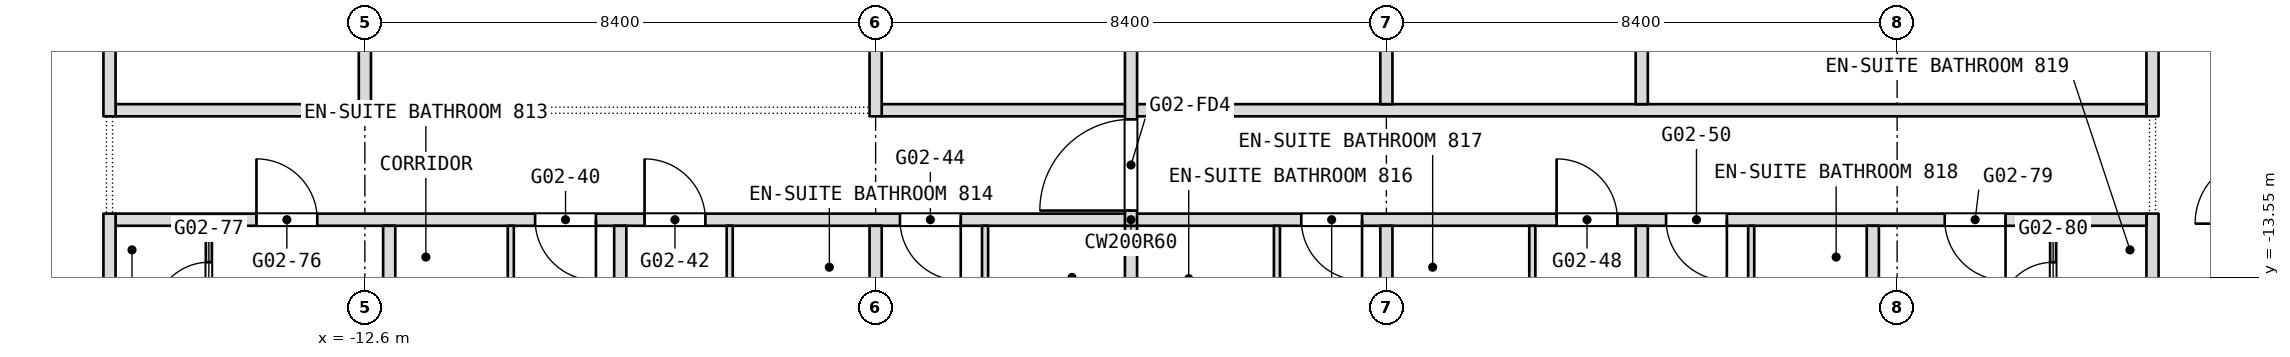
"""IFC4 building model, lengths in metres.
Left out: names, types, materials, properties, quantities, classifications, styles, units other than length and angle.
Written with IfcOpenShell. Run it as: python <this file> out.ifc"""

import sys

from ifc_helpers import new_model, si_unit, direction, frame, frame_2d, origin, place, context, subcontext, project, spatial, rectangle, extrude, element, fill, save


model = new_model("IFC4")
c1 = context("Model", 3, precision=1e-05, world=origin(), true_north=direction((0.0, 1.0)))
c2 = subcontext(c1, "Body", "Model", "MODEL_VIEW")
j1 = project(units=[si_unit("LENGTHUNIT", "METRE"), si_unit("PLANEANGLEUNIT", "RADIAN")], contexts=[c1])
p1 = place(None, origin())
s1 = spatial("IfcSite", under=j1, at=p1, CompositionType="ELEMENT")
p2 = place(p1, origin())
s2 = spatial("IfcBuilding", under=s1, at=p2, CompositionType="ELEMENT")
p3 = place(p2, frame((0.0, 0.0, 43.7)))
s3 = spatial("IfcBuildingStorey", under=s2, at=p3, CompositionType="ELEMENT", Elevation=43.7)
p4 = place(p3, frame((16.8, -17.143, 0.0), z_axis=(0.0, 0.0, 1.0), x_axis=(0.0, 1.0, 0.0)))
e1 = element("IfcWall", 1, at=p4, inside=s3, PredefinedType="PARTITIONING", context=c2, shape_type="SweptSolid", body=[
    extrude(rectangle(XDim=4.643, YDim=0.2, at=frame_2d((2.322, 0.0))), origin(), (0.0, 0.0, 1.0), 3.34),
])
p5 = place(p4, frame((0.772, 0.0, 0.0)))
e2 = element("IfcOpeningElement", 2, at=p5, cuts=e1, PredefinedType="OPENING", context=c2, shape_type="SweptSolid", body=[
    extrude(rectangle(XDim=0.9, YDim=2.1, at=frame_2d((0.45, 1.05))), frame((0.0, 0.1, 0.0), z_axis=(0.0, -1.0, 0.0), x_axis=(1.0, 0.0, 0.0)), (0.0, 0.0, 1.0), 0.2),
])
p6 = place(p3, frame((16.8, -10.9, 0.0), z_axis=(0.0, 0.0, 1.0), x_axis=(0.0, 1.0, 0.0)))
e3 = element("IfcWall", 3, at=p6, inside=s3, PredefinedType="PARTITIONING", context=c2, shape_type="SweptSolid", body=[
    extrude(rectangle(XDim=7.3, YDim=0.2, at=frame_2d((3.65, 0.0))), origin(), (0.0, 0.0, 1.0), 3.34),
])
p7 = place(p6, frame((3.15, 0.0, 0.0)))
e4 = element("IfcOpeningElement", 4, at=p7, cuts=e3, PredefinedType="OPENING", context=c2, shape_type="SweptSolid", body=[
    extrude(rectangle(XDim=1.0, YDim=2.1, at=frame_2d((0.5, 1.05))), frame((0.0, 0.1, 0.0), z_axis=(0.0, -1.0, 0.0), x_axis=(1.0, 0.0, 0.0)), (0.0, 0.0, 1.0), 0.2),
])
p8 = place(p3, frame((15.166, -15.0, 0.0), z_axis=(0.0, 0.0, 1.0), x_axis=(0.0, 1.0, 0.0)))
e5 = element("IfcWall", 5, at=p8, inside=s3, PredefinedType="PARTITIONING", context=c2, shape_type="SweptSolid", body=[
    extrude(rectangle(XDim=2.3, YDim=0.1, at=frame_2d((1.15, 0.0))), origin(), (0.0, 0.0, 1.0), 3.34),
])
p9 = place(p8, frame((0.8, 0.0, 0.0)))
e6 = element("IfcOpeningElement", 6, at=p9, cuts=e5, PredefinedType="OPENING", context=c2, shape_type="SweptSolid", body=[
    extrude(rectangle(XDim=0.9, YDim=2.1, at=frame_2d((0.45, 1.05))), frame((0.0, 0.05, 0.0), z_axis=(0.0, -1.0, 0.0), x_axis=(1.0, 0.0, 0.0)), (0.0, 0.0, 1.0), 0.1),
])
p10 = place(p3, frame((-16.7, -12.6, 0.0), z_axis=(0.0, 0.0, 1.0), x_axis=(1.0, 0.0, 0.0)))
e7 = element("IfcWall", 7, at=p10, inside=s3, PredefinedType="PARTITIONING", context=c2, shape_type="SweptSolid", body=[
    extrude(rectangle(XDim=33.4, YDim=0.2, at=frame_2d((16.7, 0.0))), origin(), (0.0, 0.0, 1.0), 3.34),
])
p11 = place(p10, frame((6.9, 0.0, 0.0)))
e8 = element("IfcOpeningElement", 8, at=p11, cuts=e7, PredefinedType="OPENING", context=c2, shape_type="SweptSolid", body=[
    extrude(rectangle(XDim=1.0, YDim=2.1, at=frame_2d((0.5, 1.05))), frame((0.0, 0.1, 0.0), z_axis=(0.0, -1.0, 0.0), x_axis=(1.0, 0.0, 0.0)), (0.0, 0.0, 1.0), 0.2),
])
p12 = place(p10, frame((8.7, 0.0, 0.0)))
e9 = element("IfcOpeningElement", 9, at=p12, cuts=e7, PredefinedType="OPENING", context=c2, shape_type="SweptSolid", body=[
    extrude(rectangle(XDim=1.0, YDim=2.1, at=frame_2d((0.5, 1.05))), frame((0.0, 0.1, 0.0), z_axis=(0.0, -1.0, 0.0), x_axis=(1.0, 0.0, 0.0)), (0.0, 0.0, 1.0), 0.2),
])
p13 = place(p10, frame((12.9, 0.0, 0.0)))
e10 = element("IfcOpeningElement", 10, at=p13, cuts=e7, PredefinedType="OPENING", context=c2, shape_type="SweptSolid", body=[
    extrude(rectangle(XDim=1.0, YDim=2.1, at=frame_2d((0.5, 1.05))), frame((0.0, 0.1, 0.0), z_axis=(0.0, -1.0, 0.0), x_axis=(1.0, 0.0, 0.0)), (0.0, 0.0, 1.0), 0.2),
])
p14 = place(p10, frame((19.5, 0.0, 0.0)))
e11 = element("IfcOpeningElement", 11, at=p14, cuts=e7, PredefinedType="OPENING", context=c2, shape_type="SweptSolid", body=[
    extrude(rectangle(XDim=1.0, YDim=2.1, at=frame_2d((0.5, 1.05))), frame((0.0, 0.1, 0.0), z_axis=(0.0, -1.0, 0.0), x_axis=(1.0, 0.0, 0.0)), (0.0, 0.0, 1.0), 0.2),
])
p15 = place(p10, frame((23.7, 0.0, 0.0)))
e12 = element("IfcOpeningElement", 12, at=p15, cuts=e7, PredefinedType="OPENING", context=c2, shape_type="SweptSolid", body=[
    extrude(rectangle(XDim=1.0, YDim=2.1, at=frame_2d((0.5, 1.05))), frame((0.0, 0.1, 0.0), z_axis=(0.0, -1.0, 0.0), x_axis=(1.0, 0.0, 0.0)), (0.0, 0.0, 1.0), 0.2),
])
p16 = place(p10, frame((25.5, 0.0, 0.0)))
e13 = element("IfcOpeningElement", 13, at=p16, cuts=e7, PredefinedType="OPENING", context=c2, shape_type="SweptSolid", body=[
    extrude(rectangle(XDim=1.0, YDim=2.1, at=frame_2d((0.5, 1.05))), frame((0.0, 0.1, 0.0), z_axis=(0.0, -1.0, 0.0), x_axis=(1.0, 0.0, 0.0)), (0.0, 0.0, 1.0), 0.2),
])
p17 = place(p10, frame((2.317, 0.0, 0.0)))
e14 = element("IfcOpeningElement", 14, at=p17, cuts=e7, PredefinedType="OPENING", context=c2, shape_type="SweptSolid", body=[
    extrude(rectangle(XDim=1.0, YDim=2.1, at=frame_2d((0.5, 1.05))), frame((0.0, 0.1, 0.0), z_axis=(0.0, -1.0, 0.0), x_axis=(1.0, 0.0, 0.0)), (0.0, 0.0, 1.0), 0.2),
])
p18 = place(p10, frame((30.083, 0.0, 0.0)))
e15 = element("IfcOpeningElement", 15, at=p18, cuts=e7, PredefinedType="OPENING", context=c2, shape_type="SweptSolid", body=[
    extrude(rectangle(XDim=1.0, YDim=2.1, at=frame_2d((0.5, 1.05))), frame((0.0, 0.1, 0.0), z_axis=(0.0, -1.0, 0.0), x_axis=(1.0, 0.0, 0.0)), (0.0, 0.0, 1.0), 0.2),
])
p19 = place(p3, frame((12.2, -15.325, 0.0), z_axis=(0.0, 0.0, 1.0), x_axis=(0.0, 1.0, 0.0)))
e16 = element("IfcWall", 16, at=p19, inside=s3, PredefinedType="PARTITIONING", context=c2, shape_type="SweptSolid", body=[
    extrude(rectangle(XDim=2.625, YDim=0.2, at=frame_2d((1.312, 0.0))), origin(), (0.0, 0.0, 1.0), 3.34),
])
p20 = place(p3, frame((-16.7, -10.8, 0.0), z_axis=(0.0, 0.0, 1.0), x_axis=(1.0, 0.0, 0.0)))
e17 = element("IfcWall", 17, at=p20, inside=s3, PredefinedType="PARTITIONING", context=c2, shape_type="SweptSolid", body=[
    extrude(rectangle(XDim=4.0, YDim=0.2, at=frame_2d((2.0, 0.0))), origin(), (0.0, 0.0, 1.0), 3.34),
])
p21 = place(p3, frame((-4.1, -10.8, 0.0), z_axis=(0.0, 0.0, 1.0), x_axis=(1.0, 0.0, 0.0)))
e18 = element("IfcWall", 18, at=p21, inside=s3, PredefinedType="PARTITIONING", context=c2, shape_type="SweptSolid", body=[
    extrude(rectangle(XDim=20.8, YDim=0.2, at=frame_2d((10.4, 0.0))), origin(), (0.0, 0.0, 1.0), 3.34),
])
p22 = place(p3, frame((10.2, -15.425, 0.0), z_axis=(0.0, 0.0, 1.0), x_axis=(0.0, 1.0, 0.0)))
e19 = element("IfcWall", 19, at=p22, inside=s3, PredefinedType="PARTITIONING", context=c2, shape_type="SweptSolid", body=[
    extrude(rectangle(XDim=2.725, YDim=0.1, at=frame_2d((1.363, 0.0))), origin(), (0.0, 0.0, 1.0), 3.34),
])
p23 = place(p22, frame((0.849, 0.0, 0.0)))
e20 = element("IfcOpeningElement", 20, at=p23, cuts=e19, PredefinedType="OPENING", context=c2, shape_type="SweptSolid", body=[
    extrude(rectangle(XDim=0.9, YDim=2.1, at=frame_2d((0.45, 1.05))), frame((0.0, 0.05, 0.0), z_axis=(0.0, -1.0, 0.0), x_axis=(1.0, 0.0, 0.0)), (0.0, 0.0, 1.0), 0.1),
])
p24 = place(p3, frame((8.4, -17.7, 0.0), z_axis=(0.0, 0.0, 1.0), x_axis=(0.0, 1.0, 0.0)))
e21 = element("IfcWall", 21, at=p24, inside=s3, PredefinedType="PARTITIONING", context=c2, shape_type="SweptSolid", body=[
    extrude(rectangle(XDim=5.0, YDim=0.2, at=frame_2d((2.5, 0.0))), origin(), (0.0, 0.0, 1.0), 3.34),
])
p25 = place(p3, frame((8.4, -10.7, 0.0), z_axis=(0.0, 0.0, 1.0), x_axis=(0.0, 1.0, 0.0)))
e22 = element("IfcWall", 22, at=p25, inside=s3, PredefinedType="PARTITIONING", context=c2, shape_type="SweptSolid", body=[
    extrude(rectangle(XDim=3.6, YDim=0.2, at=frame_2d((1.8, 0.0))), origin(), (0.0, 0.0, 1.0), 3.34),
])
p26 = place(p3, frame((6.6, -15.325, 0.0), z_axis=(0.0, 0.0, 1.0), x_axis=(0.0, 1.0, 0.0)))
e23 = element("IfcWall", 23, at=p26, inside=s3, PredefinedType="PARTITIONING", context=c2, shape_type="SweptSolid", body=[
    extrude(rectangle(XDim=2.625, YDim=0.1, at=frame_2d((1.312, 0.0))), origin(), (0.0, 0.0, 1.0), 3.34),
])
p27 = place(p26, frame((0.749, 0.0, 0.0)))
e24 = element("IfcOpeningElement", 24, at=p27, cuts=e23, PredefinedType="OPENING", context=c2, shape_type="SweptSolid", body=[
    extrude(rectangle(XDim=0.9, YDim=2.1, at=frame_2d((0.45, 1.05))), frame((0.0, 0.05, 0.0), z_axis=(0.0, -1.0, 0.0), x_axis=(1.0, 0.0, 0.0)), (0.0, 0.0, 1.0), 0.1),
])
p28 = place(p3, frame((4.2, -17.7, 0.0), z_axis=(0.0, 0.0, 1.0), x_axis=(0.0, 1.0, 0.0)))
e25 = element("IfcWall", 25, at=p28, inside=s3, PredefinedType="PARTITIONING", context=c2, shape_type="SweptSolid", body=[
    extrude(rectangle(XDim=5.0, YDim=0.2, at=frame_2d((2.5, 0.0))), origin(), (0.0, 0.0, 1.0), 3.34),
])
p29 = place(p3, frame((4.2, -10.7, 0.0), z_axis=(0.0, 0.0, 1.0), x_axis=(0.0, 1.0, 0.0)))
e26 = element("IfcWall", 26, at=p29, inside=s3, PredefinedType="PARTITIONING", context=c2, shape_type="SweptSolid", body=[
    extrude(rectangle(XDim=8.8, YDim=0.2, at=frame_2d((4.4, 0.0))), origin(), (0.0, 0.0, 1.0), 3.34),
])
p30 = place(p3, frame((2.4, -15.325, 0.0), z_axis=(0.0, 0.0, 1.0), x_axis=(0.0, 1.0, 0.0)))
e27 = element("IfcWall", 27, at=p30, inside=s3, PredefinedType="PARTITIONING", context=c2, shape_type="SweptSolid", body=[
    extrude(rectangle(XDim=2.625, YDim=0.1, at=frame_2d((1.312, 0.0))), origin(), (0.0, 0.0, 1.0), 3.34),
])
p31 = place(p3, frame((0.0, -17.7, 0.0), z_axis=(0.0, 0.0, 1.0), x_axis=(0.0, 1.0, 0.0)))
e28 = element("IfcWall", 28, at=p31, inside=s3, PredefinedType="PARTITIONING", context=c2, shape_type="SweptSolid", body=[
    extrude(rectangle(XDim=5.0, YDim=0.2, at=frame_2d((2.5, 0.0))), origin(), (0.0, 0.0, 1.0), 3.34),
])
p32 = place(p3, frame((0.0, -12.7, 0.0), z_axis=(0.0, 0.0, 1.0), x_axis=(0.0, 1.0, 0.0)))
e29 = element("IfcWall", 29, at=p32, inside=s3, PredefinedType="PARTITIONING", context=c2, shape_type="SweptSolid", body=[
    extrude(rectangle(XDim=12.7, YDim=0.2, at=frame_2d((6.35, 0.0))), origin(), (0.0, 0.0, 1.0), 3.34),
])
p33 = place(p32, frame((11.05, 0.0, 0.0)))
e30 = element("IfcOpeningElement", 30, at=p33, cuts=e29, PredefinedType="OPENING", context=c2, shape_type="SweptSolid", body=[
    extrude(rectangle(XDim=1.5, YDim=2.1, at=frame_2d((0.75, 1.05))), frame((0.0, 0.1, 0.0), z_axis=(0.0, -1.0, 0.0), x_axis=(1.0, 0.0, 0.0)), (0.0, 0.0, 1.0), 0.2),
])
p34 = place(p32, frame((0.25, 0.0, 0.0)))
e31 = element("IfcOpeningElement", 31, at=p34, cuts=e29, PredefinedType="OPENING", context=c2, shape_type="SweptSolid", body=[
    extrude(rectangle(XDim=1.5, YDim=2.1, at=frame_2d((0.75, 1.05))), frame((0.0, 0.1, 0.0), z_axis=(0.0, -1.0, 0.0), x_axis=(1.0, 0.0, 0.0)), (0.0, 0.0, 1.0), 0.2),
])
p35 = place(p3, frame((-2.4, -15.425, 0.0), z_axis=(0.0, 0.0, 1.0), x_axis=(0.0, 1.0, 0.0)))
e32 = element("IfcWall", 32, at=p35, inside=s3, PredefinedType="PARTITIONING", context=c2, shape_type="SweptSolid", body=[
    extrude(rectangle(XDim=2.725, YDim=0.1, at=frame_2d((1.363, 0.0))), origin(), (0.0, 0.0, 1.0), 3.34),
])
p36 = place(p3, frame((-4.2, -17.7, 0.0), z_axis=(0.0, 0.0, 1.0), x_axis=(0.0, 1.0, 0.0)))
e33 = element("IfcWall", 33, at=p36, inside=s3, PredefinedType="PARTITIONING", context=c2, shape_type="SweptSolid", body=[
    extrude(rectangle(XDim=5.0, YDim=0.2, at=frame_2d((2.5, 0.0))), origin(), (0.0, 0.0, 1.0), 3.34),
])
p37 = place(p3, frame((-4.2, -10.9, 0.0), z_axis=(0.0, 0.0, 1.0), x_axis=(0.0, 1.0, 0.0)))
e34 = element("IfcWall", 34, at=p37, inside=s3, PredefinedType="PARTITIONING", context=c2, shape_type="SweptSolid", body=[
    extrude(rectangle(XDim=9.0, YDim=0.2, at=frame_2d((4.5, 0.0))), origin(), (0.0, 0.0, 1.0), 3.34),
])
p38 = place(p3, frame((-6.6, -15.425, 0.0), z_axis=(0.0, 0.0, 1.0), x_axis=(0.0, 1.0, 0.0)))
e35 = element("IfcWall", 35, at=p38, inside=s3, PredefinedType="PARTITIONING", context=c2, shape_type="SweptSolid", body=[
    extrude(rectangle(XDim=2.725, YDim=0.1, at=frame_2d((1.363, 0.0))), origin(), (0.0, 0.0, 1.0), 3.34),
])
p39 = place(p38, frame((0.849, 0.0, 0.0)))
e36 = element("IfcOpeningElement", 36, at=p39, cuts=e35, PredefinedType="OPENING", context=c2, shape_type="SweptSolid", body=[
    extrude(rectangle(XDim=0.9, YDim=2.1, at=frame_2d((0.45, 1.05))), frame((0.0, 0.05, 0.0), z_axis=(0.0, -1.0, 0.0), x_axis=(1.0, 0.0, 0.0)), (0.0, 0.0, 1.0), 0.1),
])
p40 = place(p3, frame((-8.4, -17.7, 0.0), z_axis=(0.0, 0.0, 1.0), x_axis=(0.0, 1.0, 0.0)))
e37 = element("IfcWall", 37, at=p40, inside=s3, PredefinedType="PARTITIONING", context=c2, shape_type="SweptSolid", body=[
    extrude(rectangle(XDim=5.0, YDim=0.2, at=frame_2d((2.5, 0.0))), origin(), (0.0, 0.0, 1.0), 3.34),
])
p41 = place(p3, frame((-10.2, -15.325, 0.0), z_axis=(0.0, 0.0, 1.0), x_axis=(0.0, 1.0, 0.0)))
e38 = element("IfcWall", 38, at=p41, inside=s3, PredefinedType="PARTITIONING", context=c2, shape_type="SweptSolid", body=[
    extrude(rectangle(XDim=2.625, YDim=0.1, at=frame_2d((1.312, 0.0))), origin(), (0.0, 0.0, 1.0), 3.34),
])
p42 = place(p41, frame((0.749, 0.0, 0.0)))
e39 = element("IfcOpeningElement", 39, at=p42, cuts=e38, PredefinedType="OPENING", context=c2, shape_type="SweptSolid", body=[
    extrude(rectangle(XDim=0.9, YDim=2.1, at=frame_2d((0.45, 1.05))), frame((0.0, 0.05, 0.0), z_axis=(0.0, -1.0, 0.0), x_axis=(1.0, 0.0, 0.0)), (0.0, 0.0, 1.0), 0.1),
])
p43 = place(p3, frame((-12.2, -15.275, 0.0), z_axis=(0.0, 0.0, 1.0), x_axis=(0.0, 1.0, 0.0)))
e40 = element("IfcWall", 40, at=p43, inside=s3, PredefinedType="PARTITIONING", context=c2, shape_type="SweptSolid", body=[
    extrude(rectangle(XDim=2.575, YDim=0.2, at=frame_2d((1.288, 0.0))), origin(), (0.0, 0.0, 1.0), 3.34),
])
p44 = place(p3, frame((-12.6, -10.9, 0.0), z_axis=(0.0, 0.0, 1.0), x_axis=(0.0, 1.0, 0.0)))
e41 = element("IfcWall", 41, at=p44, inside=s3, PredefinedType="PARTITIONING", context=c2, shape_type="SweptSolid", body=[
    extrude(rectangle(XDim=5.6, YDim=0.2, at=frame_2d((2.8, 0.0))), origin(), (0.0, 0.0, 1.0), 3.34),
])
p45 = place(p3, frame((-15.166, -15.0, 0.0), z_axis=(0.0, 0.0, 1.0), x_axis=(0.0, 1.0, 0.0)))
e42 = element("IfcWall", 42, at=p45, inside=s3, PredefinedType="PARTITIONING", context=c2, shape_type="SweptSolid", body=[
    extrude(rectangle(XDim=2.3, YDim=0.1, at=frame_2d((1.15, 0.0))), origin(), (0.0, 0.0, 1.0), 3.34),
])
p46 = place(p45, frame((0.8, 0.0, 0.0)))
e43 = element("IfcOpeningElement", 43, at=p46, cuts=e42, PredefinedType="OPENING", context=c2, shape_type="SweptSolid", body=[
    extrude(rectangle(XDim=0.9, YDim=2.1, at=frame_2d((0.45, 1.05))), frame((0.0, 0.05, 0.0), z_axis=(0.0, -1.0, 0.0), x_axis=(1.0, 0.0, 0.0)), (0.0, 0.0, 1.0), 0.1),
])
p47 = place(p3, frame((-16.8, -17.143, 0.0), z_axis=(0.0, 0.0, 1.0), x_axis=(0.0, 1.0, 0.0)))
e44 = element("IfcWall", 44, at=p47, inside=s3, PredefinedType="PARTITIONING", context=c2, shape_type="SweptSolid", body=[
    extrude(rectangle(XDim=4.643, YDim=0.2, at=frame_2d((2.322, 0.0))), origin(), (0.0, 0.0, 1.0), 3.34),
])
p48 = place(p47, frame((0.772, 0.0, 0.0)))
e45 = element("IfcOpeningElement", 45, at=p48, cuts=e44, PredefinedType="OPENING", context=c2, shape_type="SweptSolid", body=[
    extrude(rectangle(XDim=0.9, YDim=2.1, at=frame_2d((0.45, 1.05))), frame((0.0, 0.1, 0.0), z_axis=(0.0, -1.0, 0.0), x_axis=(1.0, 0.0, 0.0)), (0.0, 0.0, 1.0), 0.2),
])
p49 = place(p3, frame((-16.8, -10.9, 0.0), z_axis=(0.0, 0.0, 1.0), x_axis=(0.0, 1.0, 0.0)))
e46 = element("IfcWall", 46, at=p49, inside=s3, PredefinedType="PARTITIONING", context=c2, shape_type="SweptSolid", body=[
    extrude(rectangle(XDim=9.0, YDim=0.2, at=frame_2d((4.5, 0.0))), origin(), (0.0, 0.0, 1.0), 3.34),
])
p50 = place(p9, origin())
e47 = element("IfcDoor", 47, at=p50, inside=s3, OperationType="SINGLE_SWING_RIGHT", PredefinedType="DOOR", context=c2, shape_type="SweptSolid", body=[
    extrude(rectangle(XDim=0.9, YDim=2.1, at=frame_2d((0.45, 1.05))), frame((0.0, 0.025, 0.0), z_axis=(0.0, -1.0, 0.0), x_axis=(1.0, 0.0, 0.0)), (0.0, 0.0, 1.0), 0.05),
])
fill(e6, e47)
p51 = place(p11, origin())
e48 = element("IfcDoor", 48, at=p51, inside=s3, OperationType="SINGLE_SWING_RIGHT", PredefinedType="DOOR", context=c2, shape_type="SweptSolid", body=[
    extrude(rectangle(XDim=1.0, YDim=2.1, at=frame_2d((0.5, 1.05))), frame((0.0, 0.025, 0.0), z_axis=(0.0, -1.0, 0.0), x_axis=(1.0, 0.0, 0.0)), (0.0, 0.0, 1.0), 0.05),
])
fill(e8, e48)
p52 = place(p12, origin())
e49 = element("IfcDoor", 49, at=p52, inside=s3, OperationType="SINGLE_SWING_RIGHT", PredefinedType="DOOR", context=c2, shape_type="SweptSolid", body=[
    extrude(rectangle(XDim=1.0, YDim=2.1, at=frame_2d((0.5, 1.05))), frame((0.0, 0.025, 0.0), z_axis=(0.0, -1.0, 0.0), x_axis=(1.0, 0.0, 0.0)), (0.0, 0.0, 1.0), 0.05),
])
fill(e9, e49)
p53 = place(p13, origin())
e50 = element("IfcDoor", 50, at=p53, inside=s3, OperationType="SINGLE_SWING_RIGHT", PredefinedType="DOOR", context=c2, shape_type="SweptSolid", body=[
    extrude(rectangle(XDim=1.0, YDim=2.1, at=frame_2d((0.5, 1.05))), frame((0.0, 0.025, 0.0), z_axis=(0.0, -1.0, 0.0), x_axis=(1.0, 0.0, 0.0)), (0.0, 0.0, 1.0), 0.05),
])
fill(e10, e50)
p54 = place(p14, origin())
e51 = element("IfcDoor", 51, at=p54, inside=s3, OperationType="SINGLE_SWING_RIGHT", PredefinedType="DOOR", context=c2, shape_type="SweptSolid", body=[
    extrude(rectangle(XDim=1.0, YDim=2.1, at=frame_2d((0.5, 1.05))), frame((0.0, 0.025, 0.0), z_axis=(0.0, -1.0, 0.0), x_axis=(1.0, 0.0, 0.0)), (0.0, 0.0, 1.0), 0.05),
])
fill(e11, e51)
p55 = place(p15, origin())
e52 = element("IfcDoor", 52, at=p55, inside=s3, OperationType="SINGLE_SWING_RIGHT", PredefinedType="DOOR", context=c2, shape_type="SweptSolid", body=[
    extrude(rectangle(XDim=1.0, YDim=2.1, at=frame_2d((0.5, 1.05))), frame((0.0, 0.025, 0.0), z_axis=(0.0, -1.0, 0.0), x_axis=(1.0, 0.0, 0.0)), (0.0, 0.0, 1.0), 0.05),
])
fill(e12, e52)
p56 = place(p16, origin())
e53 = element("IfcDoor", 53, at=p56, inside=s3, OperationType="SINGLE_SWING_RIGHT", PredefinedType="DOOR", context=c2, shape_type="SweptSolid", body=[
    extrude(rectangle(XDim=1.0, YDim=2.1, at=frame_2d((0.5, 1.05))), frame((0.0, 0.025, 0.0), z_axis=(0.0, -1.0, 0.0), x_axis=(1.0, 0.0, 0.0)), (0.0, 0.0, 1.0), 0.05),
])
fill(e13, e53)
p57 = place(p17, origin())
e54 = element("IfcDoor", 54, at=p57, inside=s3, OperationType="SINGLE_SWING_RIGHT", PredefinedType="DOOR", context=c2, shape_type="SweptSolid", body=[
    extrude(rectangle(XDim=1.0, YDim=2.1, at=frame_2d((0.5, 1.05))), frame((0.0, 0.025, 0.0), z_axis=(0.0, -1.0, 0.0), x_axis=(1.0, 0.0, 0.0)), (0.0, 0.0, 1.0), 0.05),
])
fill(e14, e54)
p58 = place(p18, origin())
e55 = element("IfcDoor", 55, at=p58, inside=s3, OperationType="SINGLE_SWING_LEFT", PredefinedType="DOOR", context=c2, shape_type="SweptSolid", body=[
    extrude(rectangle(XDim=1.0, YDim=2.1, at=frame_2d((0.5, 1.05))), frame((0.0, 0.025, 0.0), z_axis=(0.0, -1.0, 0.0), x_axis=(1.0, 0.0, 0.0)), (0.0, 0.0, 1.0), 0.05),
])
fill(e15, e55)
p59 = place(p46, origin())
e56 = element("IfcDoor", 56, at=p59, inside=s3, OperationType="SINGLE_SWING_RIGHT", PredefinedType="DOOR", context=c2, shape_type="SweptSolid", body=[
    extrude(rectangle(XDim=0.9, YDim=2.1, at=frame_2d((0.45, 1.05))), frame((0.0, 0.025, 0.0), z_axis=(0.0, -1.0, 0.0), x_axis=(1.0, 0.0, 0.0)), (0.0, 0.0, 1.0), 0.05),
])
fill(e43, e56)
p60 = place(p34, origin())
e57 = element("IfcDoor", 57, at=p60, inside=s3, OperationType="DOUBLE_DOOR_DOUBLE_SWING", PredefinedType="DOOR", context=c2, shape_type="SweptSolid", body=[
    extrude(rectangle(XDim=1.5, YDim=2.1, at=frame_2d((0.75, 1.05))), frame((0.0, 0.025, 0.0), z_axis=(0.0, -1.0, 0.0), x_axis=(1.0, 0.0, 0.0)), (0.0, 0.0, 1.0), 0.05),
])
fill(e31, e57)
save(model, sys.argv[1])
